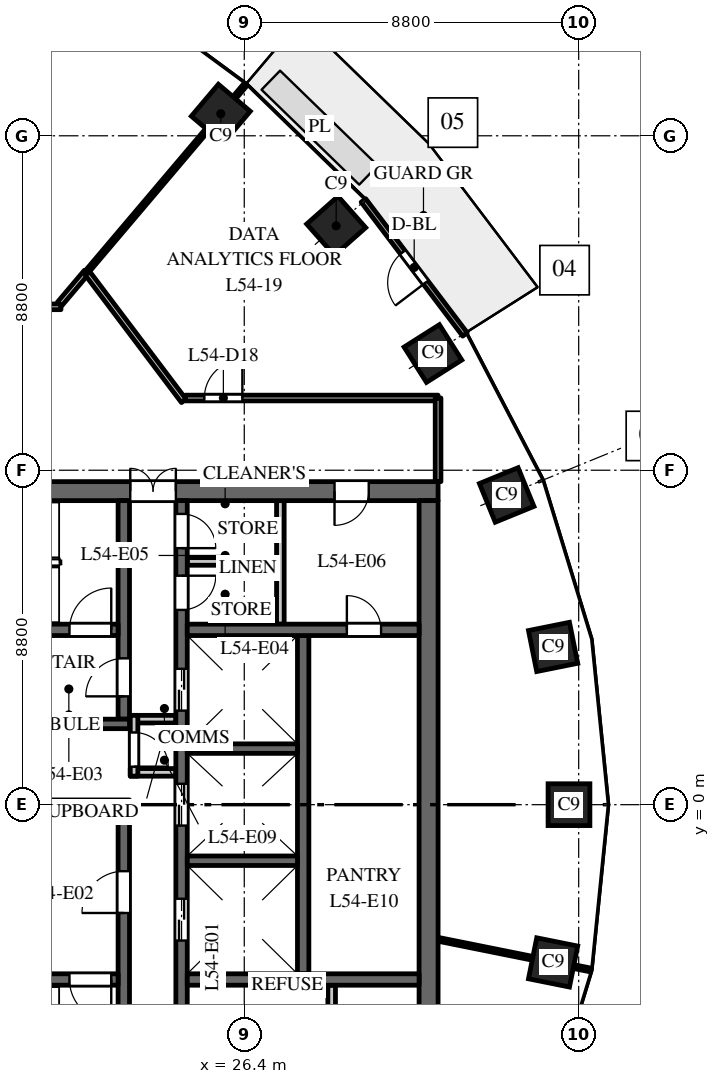
"""IFC4 building model, lengths in metres.
Left out: names, types, materials, properties, quantities, classifications, styles, units other than length and angle.
Written with IfcOpenShell. Run it as: python <this file> out.ifc"""

import sys

from ifc_helpers import new_model, si_unit, direction, frame, frame_2d, origin, origin_2d, place, context, subcontext, project, spatial, rectangle, extrude, element, fill, save


model = new_model("IFC4")
c1 = context("Model", 3, precision=1e-05, world=origin(), true_north=direction((0.0, 1.0)))
c2 = subcontext(c1, "Body", "Model", "MODEL_VIEW")
j1 = project(units=[si_unit("LENGTHUNIT", "METRE"), si_unit("PLANEANGLEUNIT", "RADIAN")], contexts=[c1])
p1 = place(None, origin())
s1 = spatial("IfcSite", under=j1, at=p1, CompositionType="ELEMENT")
p2 = place(p1, origin())
s2 = spatial("IfcBuilding", under=s1, at=p2, CompositionType="ELEMENT")
p3 = place(p2, frame((0.0, 0.0, 257.5)))
s3 = spatial("IfcBuildingStorey", under=s2, at=p3, CompositionType="ELEMENT", Elevation=257.5)
for number, where, z_axis, x_axis in (
    (1, (34.945, 0.0, 0.0), (0.0, 0.0, 1.0), (0.0, 1.0, 0.0)),
    (2, (34.527, 4.151, 0.0), (0.0, 0.0, 1.0), (-0.197, 0.98, 0.0)),
    (3, (33.305, 8.149, 0.0), (0.0, 0.0, 1.0), (-0.379, 0.925, 0.0)),
    (4, (31.365, 11.871, 0.0), (0.0, 0.0, 1.0), (-0.535, 0.845, 0.0)),
    (5, (28.819, 15.23, 0.0), (0.0, 0.0, 1.0), (-0.663, 0.749, 0.0)),
    (6, (25.783, 18.18, 0.0), (0.0, 0.0, 1.0), (-0.763, 0.646, 0.0)),
    (7, (34.527, -4.151, 0.0), (0.0, 0.0, 1.0), (0.197, 0.98, 0.0)),
):
    element("IfcColumn", number, at=place(p3, frame(where, z_axis=z_axis, x_axis=x_axis)), inside=s3, PredefinedType="COLUMN", context=c2, shape_type="SweptSolid", body=[
        extrude(rectangle(XDim=1.1, YDim=1.1, at=origin_2d()), origin(), (0.0, 0.0, 1.0), 4.0),
    ])
p4 = place(p3, frame((16.5, 8.25, 0.0), z_axis=(0.0, 0.0, 1.0), x_axis=(1.0, 0.0, 0.0)))
e8 = element("IfcWall", 8, at=p4, inside=s3, PredefinedType="SHEAR", context=c2, shape_type="SweptSolid", body=[
    extrude(rectangle(XDim=15.0, YDim=0.5, at=frame_2d((7.5, 0.0))), origin(), (0.0, 0.0, 1.0), 3.7),
])
p5 = place(p4, frame((6.9, 0.0, 0.0)))
e9 = element("IfcOpeningElement", 9, at=p5, cuts=e8, PredefinedType="OPENING", context=c2, shape_type="SweptSolid", body=[
    extrude(rectangle(XDim=1.2, YDim=2.1, at=frame_2d((0.6, 1.05))), frame((0.0, 0.26, 0.0), z_axis=(0.0, -1.0, 0.0), x_axis=(1.0, 0.0, 0.0)), (0.0, 0.0, 1.0), 0.52),
])
p6 = place(p4, frame((12.275, 0.0, 0.0)))
e10 = element("IfcOpeningElement", 10, at=p6, cuts=e8, PredefinedType="OPENING", context=c2, shape_type="SweptSolid", body=[
    extrude(rectangle(XDim=0.9, YDim=2.1, at=frame_2d((0.45, 1.05))), frame((0.0, 0.26, 0.0), z_axis=(0.0, -1.0, 0.0), x_axis=(1.0, 0.0, 0.0)), (0.0, 0.0, 1.0), 0.52),
])
p7 = place(p3, frame((27.95, -4.45, 0.0), z_axis=(0.0, 0.0, 1.0), x_axis=(0.0, 1.0, 0.0)))
e11 = element("IfcWall", 11, at=p7, inside=s3, PredefinedType="SHEAR", context=c2, shape_type="SweptSolid", body=[
    extrude(rectangle(XDim=8.9, YDim=0.3, at=frame_2d((4.45, 0.0))), origin(), (0.0, 0.0, 1.0), 3.7),
])
p8 = place(p3, frame((24.75, -8.0, 0.0), z_axis=(0.0, 0.0, 1.0), x_axis=(0.0, 1.0, 0.0)))
e12 = element("IfcWall", 12, at=p8, inside=s3, PredefinedType="SHEAR", context=c2, shape_type="SweptSolid", body=[
    extrude(rectangle(XDim=16.0, YDim=0.3, at=frame_2d((8.0, 0.0))), origin(), (0.0, 0.0, 1.0), 3.7),
])
p9 = place(p8, frame((4.425, 0.0, 0.0)))
e13 = element("IfcOpeningElement", 13, at=p9, cuts=e12, PredefinedType="OPENING", context=c2, shape_type="SweptSolid", body=[
    extrude(rectangle(XDim=1.1, YDim=2.1, at=frame_2d((0.55, 1.05))), frame((0.0, 0.16, 0.0), z_axis=(0.0, -1.0, 0.0), x_axis=(1.0, 0.0, 0.0)), (0.0, 0.0, 1.0), 0.32),
])
p10 = place(p8, frame((7.45, 0.0, 0.0)))
e14 = element("IfcOpeningElement", 14, at=p10, cuts=e12, PredefinedType="OPENING", context=c2, shape_type="SweptSolid", body=[
    extrude(rectangle(XDim=1.1, YDim=2.1, at=frame_2d((0.55, 1.05))), frame((0.0, 0.16, 0.0), z_axis=(0.0, -1.0, 0.0), x_axis=(1.0, 0.0, 0.0)), (0.0, 0.0, 1.0), 0.32),
])
p11 = place(p8, frame((10.475, 0.0, 0.0)))
e15 = element("IfcOpeningElement", 15, at=p11, cuts=e12, PredefinedType="OPENING", context=c2, shape_type="SweptSolid", body=[
    extrude(rectangle(XDim=1.1, YDim=2.1, at=frame_2d((0.55, 1.05))), frame((0.0, 0.16, 0.0), z_axis=(0.0, -1.0, 0.0), x_axis=(1.0, 0.0, 0.0)), (0.0, 0.0, 1.0), 0.32),
])
p12 = place(p8, frame((13.125, 0.0, 0.0)))
e16 = element("IfcOpeningElement", 16, at=p12, cuts=e12, PredefinedType="OPENING", context=c2, shape_type="SweptSolid", body=[
    extrude(rectangle(XDim=0.9, YDim=2.1, at=frame_2d((0.45, 1.05))), frame((0.0, 0.16, 0.0), z_axis=(0.0, -1.0, 0.0), x_axis=(1.0, 0.0, 0.0)), (0.0, 0.0, 1.0), 0.32),
])
p13 = place(p8, frame((14.75, 0.0, 0.0)))
e17 = element("IfcOpeningElement", 17, at=p13, cuts=e12, PredefinedType="OPENING", context=c2, shape_type="SweptSolid", body=[
    extrude(rectangle(XDim=0.9, YDim=2.1, at=frame_2d((0.45, 1.05))), frame((0.0, 0.16, 0.0), z_axis=(0.0, -1.0, 0.0), x_axis=(1.0, 0.0, 0.0)), (0.0, 0.0, 1.0), 0.32),
])
p14 = place(p8, frame((1.35, 0.0, 0.0)))
e18 = element("IfcOpeningElement", 18, at=p14, cuts=e12, PredefinedType="OPENING", context=c2, shape_type="SweptSolid", body=[
    extrude(rectangle(XDim=0.9, YDim=2.1, at=frame_2d((0.45, 1.05))), frame((0.0, 0.16, 0.0), z_axis=(0.0, -1.0, 0.0), x_axis=(1.0, 0.0, 0.0)), (0.0, 0.0, 1.0), 0.32),
])
p15 = place(p3, frame((20.1, 0.0, 0.0), z_axis=(0.0, 0.0, 1.0), x_axis=(1.0, 0.0, 0.0)))
e19 = element("IfcWall", 19, at=p15, inside=s3, PredefinedType="SHEAR", context=c2, shape_type="SweptSolid", body=[
    extrude(rectangle(XDim=3.28, YDim=0.25, at=frame_2d((1.64, 0.0))), origin(), (0.0, 0.0, 1.0), 3.7),
])
for number, where, z_axis, x_axis in (
    (20, (23.4, 0.85, 0.0), (0.0, 0.0, 1.0), (1.0, 0.0, 0.0)),
    (21, (23.4, 2.25, 0.0), (0.0, 0.0, 1.0), (1.0, 0.0, 0.0)),
):
    element("IfcWall", number, at=place(p3, frame(where, z_axis=z_axis, x_axis=x_axis)), inside=s3, PredefinedType="PARTITIONING", context=c2, shape_type="SweptSolid", body=[
        extrude(rectangle(XDim=1.2, YDim=0.2, at=frame_2d((0.6, 0.0))), origin(), (0.0, 0.0, 1.0), 3.7),
    ])
p16 = place(p3, frame((23.5, 0.75, 0.0), z_axis=(0.0, 0.0, 1.0), x_axis=(0.0, 1.0, 0.0)))
e22 = element("IfcWall", 22, at=p16, inside=s3, PredefinedType="PARTITIONING", context=c2, shape_type="SweptSolid", body=[
    extrude(rectangle(XDim=1.6, YDim=0.2, at=frame_2d((0.8, 0.0))), origin(), (0.0, 0.0, 1.0), 3.7),
])
p17 = place(p16, frame((0.25, 0.0, 0.0)))
e23 = element("IfcOpeningElement", 23, at=p17, cuts=e22, PredefinedType="OPENING", context=c2, shape_type="SweptSolid", body=[
    extrude(rectangle(XDim=0.9, YDim=2.1, at=frame_2d((0.45, 1.05))), frame((0.0, 0.11, 0.0), z_axis=(0.0, -1.0, 0.0), x_axis=(1.0, 0.0, 0.0)), (0.0, 0.0, 1.0), 0.22),
])
p18 = place(p3, frame((31.25, -8.0, 0.0), z_axis=(0.0, 0.0, 1.0), x_axis=(0.0, 1.0, 0.0)))
e24 = element("IfcWall", 24, at=p18, inside=s3, PredefinedType="SHEAR", context=c2, shape_type="SweptSolid", body=[
    extrude(rectangle(XDim=16.0, YDim=0.5, at=frame_2d((8.0, 0.0))), origin(), (0.0, 0.0, 1.0), 3.7),
])
p19 = place(p3, frame((24.9, 4.6, 0.0), z_axis=(0.0, 0.0, 1.0), x_axis=(1.0, 0.0, 0.0)))
e25 = element("IfcWall", 25, at=p19, inside=s3, PredefinedType="SHEAR", context=c2, shape_type="SweptSolid", body=[
    extrude(rectangle(XDim=6.1, YDim=0.3, at=frame_2d((3.05, 0.0))), origin(), (0.0, 0.0, 1.0), 3.7),
])
p20 = place(p19, frame((4.2, 0.0, 0.0)))
e26 = element("IfcOpeningElement", 26, at=p20, cuts=e25, PredefinedType="OPENING", context=c2, shape_type="SweptSolid", body=[
    extrude(rectangle(XDim=0.9, YDim=2.1, at=frame_2d((0.45, 1.05))), frame((0.0, 0.16, 0.0), z_axis=(0.0, -1.0, 0.0), x_axis=(1.0, 0.0, 0.0)), (0.0, 0.0, 1.0), 0.32),
])
for number, where, z_axis, x_axis in (
    (27, (27.35, 4.75, 0.0), (0.0, 0.0, 1.0), (0.0, 1.0, 0.0)),
    (28, (28.7, -8.0, 0.0), (0.0, 0.0, 1.0), (0.0, 1.0, 0.0)),
):
    element("IfcWall", number, at=place(p3, frame(where, z_axis=z_axis, x_axis=x_axis)), inside=s3, PredefinedType="PARTITIONING", context=c2, shape_type="SweptSolid", body=[
        extrude(rectangle(XDim=3.25, YDim=0.2, at=frame_2d((1.625, 0.0))), origin(), (0.0, 0.0, 1.0), 3.7),
    ])
p21 = place(p3, frame((24.9, 6.4, 0.0), z_axis=(0.0, 0.0, 1.0), x_axis=(1.0, 0.0, 0.0)))
e29 = element("IfcWall", 29, at=p21, inside=s3, PredefinedType="PARTITIONING", context=c2, shape_type="SweptSolid", body=[
    extrude(rectangle(XDim=2.35, YDim=0.2, at=frame_2d((1.175, 0.0))), origin(), (0.0, 0.0, 1.0), 3.7),
])
p22 = place(p3, frame((24.9, -4.6, 0.0), z_axis=(0.0, 0.0, 1.0), x_axis=(1.0, 0.0, 0.0)))
e30 = element("IfcWall", 30, at=p22, inside=s3, PredefinedType="SHEAR", context=c2, shape_type="SweptSolid", body=[
    extrude(rectangle(XDim=6.1, YDim=0.3, at=frame_2d((3.05, 0.0))), origin(), (0.0, 0.0, 1.0), 3.7),
])
for number, where, z_axis, x_axis in (
    (31, (24.9, -1.475, 0.0), (0.0, 0.0, 1.0), (1.0, 0.0, 0.0)),
    (32, (24.9, 1.475, 0.0), (0.0, 0.0, 1.0), (1.0, 0.0, 0.0)),
):
    element("IfcWall", number, at=place(p3, frame(where, z_axis=z_axis, x_axis=x_axis)), inside=s3, PredefinedType="SHEAR", context=c2, shape_type="SweptSolid", body=[
        extrude(rectangle(XDim=2.9, YDim=0.25, at=frame_2d((1.45, 0.0))), origin(), (0.0, 0.0, 1.0), 3.7),
    ])
p23 = place(p3, frame((23.23, 2.25, 0.0), z_axis=(0.0, 0.0, 1.0), x_axis=(0.0, 1.0, 0.0)))
e33 = element("IfcWall", 33, at=p23, inside=s3, PredefinedType="SHEAR", context=c2, shape_type="SweptSolid", body=[
    extrude(rectangle(XDim=5.75, YDim=0.3, at=frame_2d((2.875, 0.0))), origin(), (0.0, 0.0, 1.0), 3.7),
])
p24 = place(p23, frame((0.6, 0.0, 0.0)))
e34 = element("IfcOpeningElement", 34, at=p24, cuts=e33, PredefinedType="OPENING", context=c2, shape_type="SweptSolid", body=[
    extrude(rectangle(XDim=1.0, YDim=2.1, at=frame_2d((0.5, 1.05))), frame((0.0, 0.16, 0.0), z_axis=(0.0, -1.0, 0.0), x_axis=(1.0, 0.0, 0.0)), (0.0, 0.0, 1.0), 0.32),
])
p25 = place(p3, frame((23.23, -8.0, 0.0), z_axis=(0.0, 0.0, 1.0), x_axis=(0.0, 1.0, 0.0)))
e35 = element("IfcWall", 35, at=p25, inside=s3, PredefinedType="SHEAR", context=c2, shape_type="SweptSolid", body=[
    extrude(rectangle(XDim=7.875, YDim=0.3, at=frame_2d((3.938, 0.0))), origin(), (0.0, 0.0, 1.0), 3.7),
])
p26 = place(p25, frame((5.15, 0.0, 0.0)))
e36 = element("IfcOpeningElement", 36, at=p26, cuts=e35, PredefinedType="OPENING", context=c2, shape_type="SweptSolid", body=[
    extrude(rectangle(XDim=1.1, YDim=2.1, at=frame_2d((0.55, 1.05))), frame((0.0, 0.16, 0.0), z_axis=(0.0, -1.0, 0.0), x_axis=(1.0, 0.0, 0.0)), (0.0, 0.0, 1.0), 0.32),
])
p27 = place(p3, frame((16.9, 4.6, 0.0), z_axis=(0.0, 0.0, 1.0), x_axis=(1.0, 0.0, 0.0)))
e37 = element("IfcWall", 37, at=p27, inside=s3, PredefinedType="SHEAR", context=c2, shape_type="SweptSolid", body=[
    extrude(rectangle(XDim=6.18, YDim=0.3, at=frame_2d((3.09, 0.0))), origin(), (0.0, 0.0, 1.0), 3.7),
])
p28 = place(p27, frame((4.9, 0.0, 0.0)))
e38 = element("IfcOpeningElement", 38, at=p28, cuts=e37, PredefinedType="OPENING", context=c2, shape_type="SweptSolid", body=[
    extrude(rectangle(XDim=1.1, YDim=2.1, at=frame_2d((0.55, 1.05))), frame((0.0, 0.16, 0.0), z_axis=(0.0, -1.0, 0.0), x_axis=(1.0, 0.0, 0.0)), (0.0, 0.0, 1.0), 0.32),
])
p29 = place(p3, frame((16.9, -4.6, 0.0), z_axis=(0.0, 0.0, 1.0), x_axis=(1.0, 0.0, 0.0)))
e39 = element("IfcWall", 39, at=p29, inside=s3, PredefinedType="SHEAR", context=c2, shape_type="SweptSolid", body=[
    extrude(rectangle(XDim=6.18, YDim=0.3, at=frame_2d((3.09, 0.0))), origin(), (0.0, 0.0, 1.0), 3.7),
])
p30 = place(p29, frame((4.9, 0.0, 0.0)))
e40 = element("IfcOpeningElement", 40, at=p30, cuts=e39, PredefinedType="OPENING", context=c2, shape_type="SweptSolid", body=[
    extrude(rectangle(XDim=1.1, YDim=2.1, at=frame_2d((0.55, 1.05))), frame((0.0, 0.16, 0.0), z_axis=(0.0, -1.0, 0.0), x_axis=(1.0, 0.0, 0.0)), (0.0, 0.0, 1.0), 0.32),
])
p31 = place(p3, frame((20.85, 2.125, 0.0), z_axis=(0.0, 0.0, 1.0), x_axis=(1.0, 0.0, 0.0)))
e41 = element("IfcWall", 41, at=p31, inside=s3, PredefinedType="SHEAR", context=c2, shape_type="SweptSolid", body=[
    extrude(rectangle(XDim=2.53, YDim=0.25, at=frame_2d((1.265, 0.0))), origin(), (0.0, 0.0, 1.0), 3.7),
])
p32 = place(p3, frame((32.208, 12.374, 0.0), z_axis=(0.0, 0.0, 1.0), x_axis=(-0.604045763106, 0.796949632081, 0.0)))
e42 = element("IfcWall", 42, at=p32, inside=s3, PredefinedType="STANDARD", context=c2, shape_type="SweptSolid", body=[
    extrude(rectangle(XDim=4.423, YDim=0.15, at=frame_2d((2.212, 0.0))), origin(), (0.0, 0.0, 1.0), 3.7),
])
p33 = place(p32, frame((1.712, 0.0, 0.0)))
e43 = element("IfcOpeningElement", 43, at=p33, cuts=e42, PredefinedType="OPENING", context=c2, shape_type="SweptSolid", body=[
    extrude(rectangle(XDim=1.0, YDim=2.4, at=frame_2d((0.5, 1.2))), frame((0.0, 0.085, 0.0), z_axis=(0.0, -1.0, 0.0), x_axis=(1.0, 0.0, 0.0)), (0.0, 0.0, 1.0), 0.17),
])
p34 = place(p3, frame((7.524, 13.1, 0.0), z_axis=(0.0, 0.0, 1.0), x_axis=(1.0, 0.0, 0.0)))
e44 = element("IfcWall", 44, at=p34, inside=s3, PredefinedType="PARTITIONING", context=c2, shape_type="SweptSolid", body=[
    extrude(rectangle(XDim=14.052, YDim=0.15, at=frame_2d((7.026, 0.0))), origin(), (0.0, 0.0, 1.0), 2.85),
])
p35 = place(p34, frame((0.554, 0.0, 0.0)))
e45 = element("IfcOpeningElement", 45, at=p35, cuts=e44, PredefinedType="OPENING", context=c2, shape_type="SweptSolid", body=[
    extrude(rectangle(XDim=1.0, YDim=2.1, at=frame_2d((0.5, 1.05))), frame((0.0, 0.085, 0.0), z_axis=(0.0, -1.0, 0.0), x_axis=(1.0, 0.0, 0.0)), (0.0, 0.0, 1.0), 0.17),
])
p36 = place(p3, frame((21.541, 13.175, 0.0), z_axis=(0.0, 0.0, 1.0), x_axis=(0.646460291141, 0.762947633837, 0.0)))
e46 = element("IfcWall", 46, at=p36, inside=s3, PredefinedType="PARTITIONING", context=c2, shape_type="SweptSolid", body=[
    extrude(rectangle(XDim=1.098, YDim=0.15, at=frame_2d((0.549, 0.0))), origin(), (0.0, 0.0, 1.0), 3.7),
])
p37 = place(p3, frame((22.251, 14.013, 0.0), z_axis=(0.0, 0.0, 1.0), x_axis=(0.602435944628, -0.798167233492, 0.0)))
e47 = element("IfcWall", 47, at=p37, inside=s3, PredefinedType="PARTITIONING", context=c2, shape_type="SweptSolid", body=[
    extrude(rectangle(XDim=4.245, YDim=0.15, at=frame_2d((2.122, 0.0))), origin(), (0.0, 0.0, 1.0), 2.75),
])
p38 = place(p3, frame((22.251, 14.013, 0.0), z_axis=(0.0, 0.0, 1.0), x_axis=(0.646448300096, 0.76295779392, 0.0)))
e48 = element("IfcWall", 48, at=p38, inside=s3, PredefinedType="PARTITIONING", context=c2, shape_type="SweptSolid", body=[
    extrude(rectangle(XDim=6.465, YDim=0.1, at=frame_2d((3.232, 0.0))), origin(), (0.0, 0.0, 1.0), 3.0),
])
p39 = place(p3, frame((24.845, 10.7, 0.0), z_axis=(0.0, 0.0, 1.0), x_axis=(1.0, 0.0, 0.0)))
e49 = element("IfcWall", 49, at=p39, inside=s3, PredefinedType="PARTITIONING", context=c2, shape_type="SweptSolid", body=[
    extrude(rectangle(XDim=6.655, YDim=0.15, at=frame_2d((3.328, 0.0))), origin(), (0.0, 0.0, 1.0), 3.0),
])
p40 = place(p39, frame((0.505, 0.0, 0.0)))
e50 = element("IfcOpeningElement", 50, at=p40, cuts=e49, PredefinedType="OPENING", context=c2, shape_type="SweptSolid", body=[
    extrude(rectangle(XDim=1.0, YDim=2.1, at=frame_2d((0.5, 1.05))), frame((0.0, 0.085, 0.0), z_axis=(0.0, -1.0, 0.0), x_axis=(1.0, 0.0, 0.0)), (0.0, 0.0, 1.0), 0.17),
])
p41 = place(p3, frame((31.5, -3.542, 0.0), z_axis=(0.0, 0.0, 1.0), x_axis=(0.980357474535, -0.197228857227, 0.0)))
e51 = element("IfcWall", 51, at=p41, inside=s3, PredefinedType="PARTITIONING", context=c2, shape_type="SweptSolid", body=[
    extrude(rectangle(XDim=4.092, YDim=0.1, at=frame_2d((2.046, 0.0))), origin(), (0.0, 0.0, 1.0), 3.0),
])
p42 = place(p3, frame((31.5, 8.5, 0.0), z_axis=(0.0, 0.0, 1.0), x_axis=(0.0, 1.0, 0.0)))
e52 = element("IfcWall", 52, at=p42, inside=s3, PredefinedType="PARTITIONING", context=c2, shape_type="SweptSolid", body=[
    extrude(rectangle(XDim=2.2, YDim=0.15, at=frame_2d((1.1, 0.0))), origin(), (0.0, 0.0, 1.0), 3.0),
])
p43 = place(p9, origin())
e53 = element("IfcDoor", 53, at=p43, inside=s3, OperationType="DOUBLE_DOOR_SLIDING", PredefinedType="DOOR", context=c2, shape_type="SweptSolid", body=[
    extrude(rectangle(XDim=1.1, YDim=2.1, at=frame_2d((0.55, 1.05))), frame((0.0, 0.025, 0.0), z_axis=(0.0, -1.0, 0.0), x_axis=(1.0, 0.0, 0.0)), (0.0, 0.0, 1.0), 0.05),
])
fill(e13, e53)
p44 = place(p10, origin())
e54 = element("IfcDoor", 54, at=p44, inside=s3, OperationType="DOUBLE_DOOR_SLIDING", PredefinedType="DOOR", context=c2, shape_type="SweptSolid", body=[
    extrude(rectangle(XDim=1.1, YDim=2.1, at=frame_2d((0.55, 1.05))), frame((0.0, 0.025, 0.0), z_axis=(0.0, -1.0, 0.0), x_axis=(1.0, 0.0, 0.0)), (0.0, 0.0, 1.0), 0.05),
])
fill(e14, e54)
p45 = place(p11, origin())
e55 = element("IfcDoor", 55, at=p45, inside=s3, OperationType="DOUBLE_DOOR_SLIDING", PredefinedType="DOOR", context=c2, shape_type="SweptSolid", body=[
    extrude(rectangle(XDim=1.1, YDim=2.1, at=frame_2d((0.55, 1.05))), frame((0.0, 0.025, 0.0), z_axis=(0.0, -1.0, 0.0), x_axis=(1.0, 0.0, 0.0)), (0.0, 0.0, 1.0), 0.05),
])
fill(e15, e55)
p46 = place(p28, origin())
e56 = element("IfcDoor", 56, at=p46, inside=s3, OperationType="SINGLE_SWING_LEFT", PredefinedType="DOOR", context=c2, shape_type="SweptSolid", body=[
    extrude(rectangle(XDim=1.1, YDim=2.1, at=frame_2d((0.55, 1.05))), frame((0.0, 0.025, 0.0), z_axis=(0.0, -1.0, 0.0), x_axis=(1.0, 0.0, 0.0)), (0.0, 0.0, 1.0), 0.05),
])
fill(e38, e56)
p47 = place(p30, origin())
e57 = element("IfcDoor", 57, at=p47, inside=s3, OperationType="SINGLE_SWING_RIGHT", PredefinedType="DOOR", context=c2, shape_type="SweptSolid", body=[
    extrude(rectangle(XDim=1.1, YDim=2.1, at=frame_2d((0.55, 1.05))), frame((0.0, 0.025, 0.0), z_axis=(0.0, -1.0, 0.0), x_axis=(1.0, 0.0, 0.0)), (0.0, 0.0, 1.0), 0.05),
])
fill(e40, e57)
p48 = place(p26, origin())
e58 = element("IfcDoor", 58, at=p48, inside=s3, OperationType="SINGLE_SWING_RIGHT", PredefinedType="DOOR", context=c2, shape_type="SweptSolid", body=[
    extrude(rectangle(XDim=1.1, YDim=2.1, at=frame_2d((0.55, 1.05))), frame((0.0, 0.025, 0.0), z_axis=(0.0, -1.0, 0.0), x_axis=(1.0, 0.0, 0.0)), (0.0, 0.0, 1.0), 0.05),
])
fill(e36, e58)
p49 = place(p24, origin())
e59 = element("IfcDoor", 59, at=p49, inside=s3, OperationType="SINGLE_SWING_RIGHT", PredefinedType="DOOR", context=c2, shape_type="SweptSolid", body=[
    extrude(rectangle(XDim=1.0, YDim=2.1, at=frame_2d((0.5, 1.05))), frame((0.0, 0.025, 0.0), z_axis=(0.0, -1.0, 0.0), x_axis=(1.0, 0.0, 0.0)), (0.0, 0.0, 1.0), 0.05),
])
fill(e34, e59)
p50 = place(p5, origin())
e60 = element("IfcDoor", 60, at=p50, inside=s3, OperationType="DOUBLE_DOOR_DOUBLE_SWING", PredefinedType="DOOR", context=c2, shape_type="SweptSolid", body=[
    extrude(rectangle(XDim=1.2, YDim=2.1, at=frame_2d((0.6, 1.05))), frame((0.0, 0.025, 0.0), z_axis=(0.0, -1.0, 0.0), x_axis=(1.0, 0.0, 0.0)), (0.0, 0.0, 1.0), 0.05),
])
fill(e9, e60)
p51 = place(p12, origin())
e61 = element("IfcDoor", 61, at=p51, inside=s3, OperationType="SINGLE_SWING_RIGHT", PredefinedType="DOOR", context=c2, shape_type="SweptSolid", body=[
    extrude(rectangle(XDim=0.9, YDim=2.1, at=frame_2d((0.45, 1.05))), frame((0.0, 0.025, 0.0), z_axis=(0.0, -1.0, 0.0), x_axis=(1.0, 0.0, 0.0)), (0.0, 0.0, 1.0), 0.05),
])
fill(e16, e61)
p52 = place(p13, origin())
e62 = element("IfcDoor", 62, at=p52, inside=s3, OperationType="SINGLE_SWING_LEFT", PredefinedType="DOOR", context=c2, shape_type="SweptSolid", body=[
    extrude(rectangle(XDim=0.9, YDim=2.1, at=frame_2d((0.45, 1.05))), frame((0.0, 0.025, 0.0), z_axis=(0.0, -1.0, 0.0), x_axis=(1.0, 0.0, 0.0)), (0.0, 0.0, 1.0), 0.05),
])
fill(e17, e62)
p53 = place(p6, origin())
e63 = element("IfcDoor", 63, at=p53, inside=s3, OperationType="SINGLE_SWING_LEFT", PredefinedType="DOOR", context=c2, shape_type="SweptSolid", body=[
    extrude(rectangle(XDim=0.9, YDim=2.1, at=frame_2d((0.45, 1.05))), frame((0.0, 0.025, 0.0), z_axis=(0.0, -1.0, 0.0), x_axis=(1.0, 0.0, 0.0)), (0.0, 0.0, 1.0), 0.05),
])
fill(e10, e63)
p54 = place(p17, origin())
e64 = element("IfcDoor", 64, at=p54, inside=s3, OperationType="SINGLE_SWING_LEFT", PredefinedType="DOOR", context=c2, shape_type="SweptSolid", body=[
    extrude(rectangle(XDim=0.9, YDim=2.1, at=frame_2d((0.45, 1.05))), frame((0.0, 0.025, 0.0), z_axis=(0.0, -1.0, 0.0), x_axis=(1.0, 0.0, 0.0)), (0.0, 0.0, 1.0), 0.05),
])
fill(e23, e64)
p55 = place(p20, origin())
e65 = element("IfcDoor", 65, at=p55, inside=s3, OperationType="SINGLE_SWING_RIGHT", PredefinedType="DOOR", context=c2, shape_type="SweptSolid", body=[
    extrude(rectangle(XDim=0.9, YDim=2.1, at=frame_2d((0.45, 1.05))), frame((0.0, 0.025, 0.0), z_axis=(0.0, -1.0, 0.0), x_axis=(1.0, 0.0, 0.0)), (0.0, 0.0, 1.0), 0.05),
])
fill(e26, e65)
p56 = place(p33, origin())
e66 = element("IfcDoor", 66, at=p56, inside=s3, OperationType="SINGLE_SWING_LEFT", PredefinedType="DOOR", context=c2, shape_type="SweptSolid", body=[
    extrude(rectangle(XDim=1.0, YDim=2.4, at=frame_2d((0.5, 1.2))), frame((0.0, 0.025, 0.0), z_axis=(0.0, -1.0, 0.0), x_axis=(1.0, 0.0, 0.0)), (0.0, 0.0, 1.0), 0.05),
])
fill(e43, e66)
p57 = place(p40, origin())
e67 = element("IfcDoor", 67, at=p57, inside=s3, OperationType="SINGLE_SWING_RIGHT", PredefinedType="DOOR", context=c2, shape_type="SweptSolid", body=[
    extrude(rectangle(XDim=1.0, YDim=2.1, at=frame_2d((0.5, 1.05))), frame((0.0, 0.025, 0.0), z_axis=(0.0, -1.0, 0.0), x_axis=(1.0, 0.0, 0.0)), (0.0, 0.0, 1.0), 0.05),
])
fill(e50, e67)
save(model, sys.argv[1])
